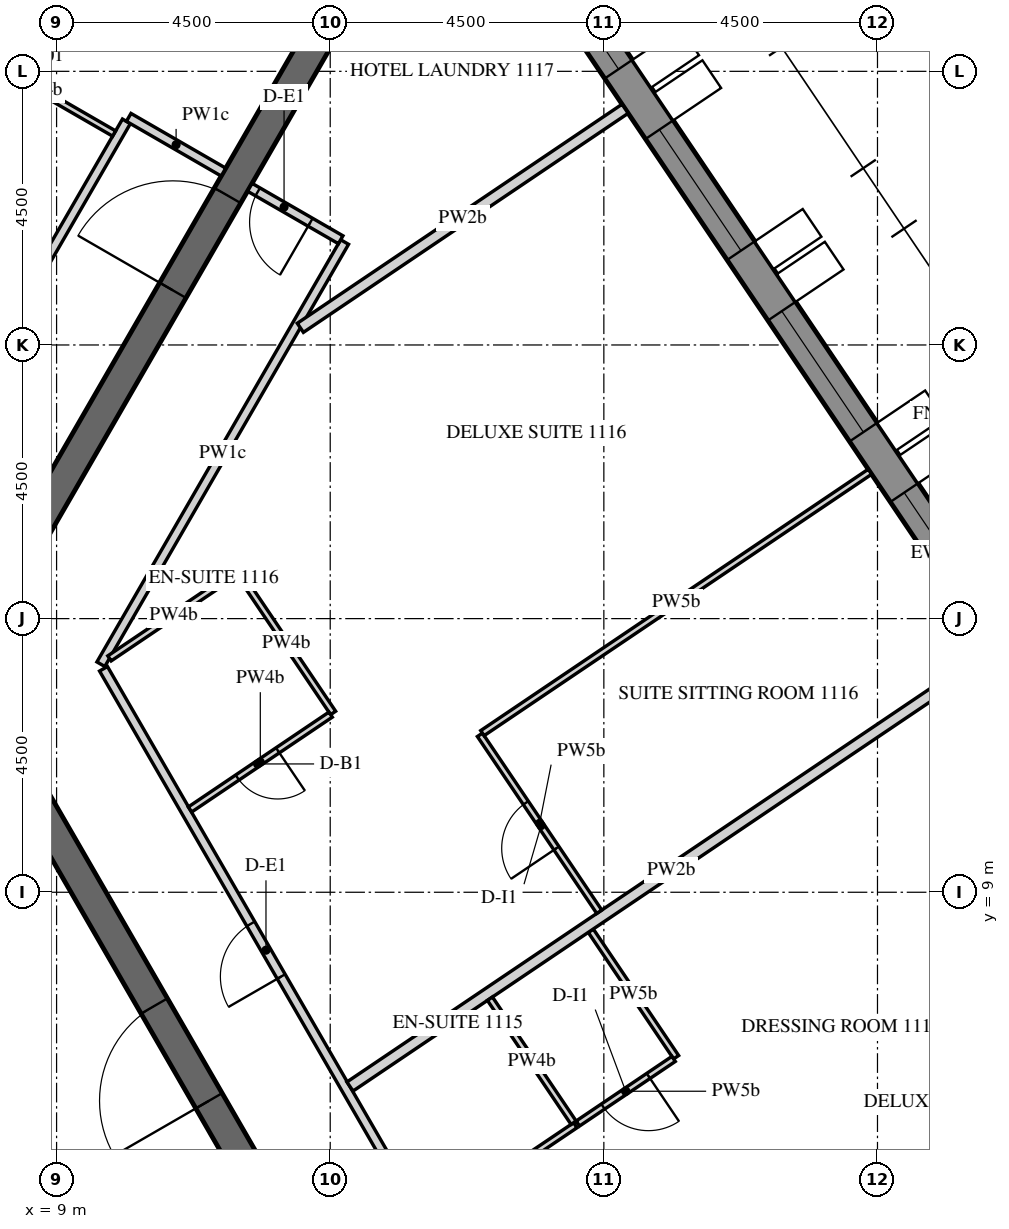
"""IFC4 building model, lengths in metres.
Left out: names, types, materials, properties, quantities, classifications, styles, units other than length and angle.
Written with IfcOpenShell. Run it as: python <this file> out.ifc"""

import sys

from ifc_helpers import new_model, si_unit, direction, frame, frame_2d, origin, place, context, subcontext, project, spatial, polyline, rectangle, outline, extrude, element, fill, save


model = new_model("IFC4")
c1 = context("Model", 3, precision=1e-05, world=origin(), true_north=direction((0.0, 1.0)))
c2 = subcontext(c1, "Body", "Model", "MODEL_VIEW")
j1 = project(units=[si_unit("LENGTHUNIT", "METRE"), si_unit("PLANEANGLEUNIT", "RADIAN")], contexts=[c1])
p1 = place(None, origin())
s1 = spatial("IfcSite", under=j1, at=p1, CompositionType="ELEMENT")
p2 = place(p1, origin())
s2 = spatial("IfcBuilding", under=s1, at=p2, CompositionType="ELEMENT")
p3 = place(p2, frame((0.0, 0.0, 152.7)))
s3 = spatial("IfcBuildingStorey", under=s2, at=p3, CompositionType="ELEMENT", Elevation=152.7)
p4 = place(p3, frame((31.371, 3.071, 0.0), z_axis=(0.0, 0.0, 1.0), x_axis=(-0.559189891278, 0.829039604297, 0.0)))
e1 = element("IfcWall", 1, at=p4, inside=s3, PredefinedType="SOLIDWALL", context=c2, shape_type="SweptSolid", body=[
    extrude(outline(polyline([(-0.026, -0.275), (27.781, -0.275), (27.736, 0.275), (0.026, 0.275), (-0.026, -0.275)])), origin(), (0.0, 0.0, 1.0), 3.75),
])
p5 = place(p4, frame((1.879, 0.0, 0.9)))
e2 = element("IfcOpeningElement", 2, at=p5, cuts=e1, PredefinedType="OPENING", context=c2, shape_type="SweptSolid", body=[
    extrude(rectangle(XDim=2.4, YDim=2.4, at=frame_2d((1.2, 1.2))), frame((0.0, 0.285, 0.0), z_axis=(0.0, -1.0, 0.0), x_axis=(1.0, 0.0, 0.0)), (0.0, 0.0, 1.0), 0.57),
])
p6 = place(p4, frame((5.479, 0.0, 0.9)))
e3 = element("IfcOpeningElement", 3, at=p6, cuts=e1, PredefinedType="OPENING", context=c2, shape_type="SweptSolid", body=[
    extrude(rectangle(XDim=2.4, YDim=2.4, at=frame_2d((1.2, 1.2))), frame((0.0, 0.285, 0.0), z_axis=(0.0, -1.0, 0.0), x_axis=(1.0, 0.0, 0.0)), (0.0, 0.0, 1.0), 0.57),
])
p7 = place(p4, frame((9.079, 0.0, 0.9)))
e4 = element("IfcOpeningElement", 4, at=p7, cuts=e1, PredefinedType="OPENING", context=c2, shape_type="SweptSolid", body=[
    extrude(rectangle(XDim=2.4, YDim=2.4, at=frame_2d((1.2, 1.2))), frame((0.0, 0.285, 0.0), z_axis=(0.0, -1.0, 0.0), x_axis=(1.0, 0.0, 0.0)), (0.0, 0.0, 1.0), 0.57),
])
p8 = place(p4, frame((12.679, 0.0, 0.9)))
e5 = element("IfcOpeningElement", 5, at=p8, cuts=e1, PredefinedType="OPENING", context=c2, shape_type="SweptSolid", body=[
    extrude(rectangle(XDim=2.4, YDim=2.4, at=frame_2d((1.2, 1.2))), frame((0.0, 0.285, 0.0), z_axis=(0.0, -1.0, 0.0), x_axis=(1.0, 0.0, 0.0)), (0.0, 0.0, 1.0), 0.57),
])
p9 = place(p4, frame((16.279, 0.0, 0.9)))
e6 = element("IfcOpeningElement", 6, at=p9, cuts=e1, PredefinedType="OPENING", context=c2, shape_type="SweptSolid", body=[
    extrude(rectangle(XDim=2.4, YDim=2.4, at=frame_2d((1.2, 1.2))), frame((0.0, 0.285, 0.0), z_axis=(0.0, -1.0, 0.0), x_axis=(1.0, 0.0, 0.0)), (0.0, 0.0, 1.0), 0.57),
])
p10 = place(p4, frame((19.879, 0.0, 0.9)))
e7 = element("IfcOpeningElement", 7, at=p10, cuts=e1, PredefinedType="OPENING", context=c2, shape_type="SweptSolid", body=[
    extrude(rectangle(XDim=2.4, YDim=2.4, at=frame_2d((1.2, 1.2))), frame((0.0, 0.285, 0.0), z_axis=(0.0, -1.0, 0.0), x_axis=(1.0, 0.0, 0.0)), (0.0, 0.0, 1.0), 0.57),
])
p11 = place(p4, frame((23.479, 0.0, 0.9)))
e8 = element("IfcOpeningElement", 8, at=p11, cuts=e1, PredefinedType="OPENING", context=c2, shape_type="SweptSolid", body=[
    extrude(rectangle(XDim=2.4, YDim=2.4, at=frame_2d((1.2, 1.2))), frame((0.0, 0.285, 0.0), z_axis=(0.0, -1.0, 0.0), x_axis=(1.0, 0.0, 0.0)), (0.0, 0.0, 1.0), 0.57),
])
p12 = place(p3, frame((14.722, 0.0, 0.0), z_axis=(0.0, 0.0, 1.0), x_axis=(-0.50000571537, 0.866022103989, 0.0)))
e9 = element("IfcWall", 9, at=p12, inside=s3, PredefinedType="SHEAR", context=c2, shape_type="SweptSolid", body=[
    extrude(outline(polyline([(-0.144, -0.25), (14.867, -0.25), (14.578, 0.25), (0.144, 0.25), (-0.144, -0.25)])), origin(), (0.0, 0.0, 1.0), 3.75),
])
p13 = place(p12, frame((6.432, 0.0, 0.0)))
e10 = element("IfcOpeningElement", 10, at=p13, cuts=e9, PredefinedType="OPENING", context=c2, shape_type="SweptSolid", body=[
    extrude(rectangle(XDim=1.8, YDim=2.4, at=frame_2d((0.9, 1.2))), frame((0.0, 0.26, 0.0), z_axis=(0.0, -1.0, 0.0), x_axis=(1.0, 0.0, 0.0)), (0.0, 0.0, 1.0), 0.52),
])
p14 = place(p3, frame((7.506, 13.0, 0.0), z_axis=(0.0, 0.0, 1.0), x_axis=(0.499988271576, 0.866032175087, 0.0)))
e11 = element("IfcWall", 11, at=p14, inside=s3, PredefinedType="SHEAR", context=c2, shape_type="SweptSolid", body=[
    extrude(rectangle(XDim=15.424, YDim=0.5, at=frame_2d((7.712, 0.0))), origin(), (0.0, 0.0, 1.0), 3.75),
])
p15 = place(p14, frame((6.812, 0.0, 0.0)))
e12 = element("IfcOpeningElement", 12, at=p15, cuts=e11, PredefinedType="OPENING", context=c2, shape_type="SweptSolid", body=[
    extrude(rectangle(XDim=1.8, YDim=2.4, at=frame_2d((0.9, 1.2))), frame((0.0, 0.26, 0.0), z_axis=(0.0, -1.0, 0.0), x_axis=(1.0, 0.0, 0.0)), (0.0, 0.0, 1.0), 0.52),
])
p16 = place(p3, frame((11.345, 0.0, 0.0), z_axis=(0.0, 0.0, 1.0), x_axis=(-0.499995046907, 0.866028263435, 0.0)))
e13 = element("IfcWall", 13, at=p16, inside=s3, PredefinedType="SHEAR", context=c2, shape_type="SweptSolid", body=[
    extrude(outline(polyline([(-0.101, -0.175), (11.446, -0.175), (11.244, 0.175), (0.101, 0.175), (-0.101, -0.175)])), origin(), (0.0, 0.0, 1.0), 3.75),
])
p17 = place(p16, frame((4.744, 0.0, 0.0)))
e14 = element("IfcOpeningElement", 14, at=p17, cuts=e13, PredefinedType="OPENING", context=c2, shape_type="SweptSolid", body=[
    extrude(rectangle(XDim=1.8, YDim=2.4, at=frame_2d((0.9, 1.2))), frame((0.0, 0.185, 0.0), z_axis=(0.0, -1.0, 0.0), x_axis=(1.0, 0.0, 0.0)), (0.0, 0.0, 1.0), 0.37),
])
p18 = place(p3, frame((10.149, 21.678, 0.0), z_axis=(0.0, 0.0, 1.0), x_axis=(-0.499997422768, -0.866026891745, 0.0)))
e15 = element("IfcWall", 15, at=p18, inside=s3, PredefinedType="PARTITIONING", context=c2, shape_type="SweptSolid", body=[
    extrude(rectangle(XDim=7.942, YDim=0.15, at=frame_2d((3.971, 0.0))), origin(), (0.0, 0.0, 1.0), 2.823),
])
p19 = place(p18, frame((4.833, 0.0, 0.0)))
e16 = element("IfcOpeningElement", 16, at=p19, cuts=e15, PredefinedType="OPENING", context=c2, shape_type="SweptSolid", body=[
    extrude(rectangle(XDim=1.0, YDim=2.1, at=frame_2d((0.5, 1.05))), frame((0.0, 0.085, 0.0), z_axis=(0.0, -1.0, 0.0), x_axis=(1.0, 0.0, 0.0)), (0.0, 0.0, 1.0), 0.17),
])
p20 = place(p3, frame((11.745, 20.843, 0.0), z_axis=(0.0, 0.0, 1.0), x_axis=(-0.865989075817, 0.500062916607, 0.0)))
e17 = element("IfcWall", 17, at=p20, inside=s3, PredefinedType="PARTITIONING", context=c2, shape_type="SweptSolid", body=[
    extrude(rectangle(XDim=1.8, YDim=0.15, at=frame_2d((0.9, 0.0))), origin(), (0.0, 0.0, 1.0), 2.823),
])
p21 = place(p3, frame((17.046, 0.075, 0.0), z_axis=(0.0, 0.0, 1.0), x_axis=(-0.499999403554, 0.866025748143, 0.0)))
e18 = element("IfcWall", 18, at=p21, inside=s3, PredefinedType="PARTITIONING", context=c2, shape_type="SweptSolid", body=[
    extrude(rectangle(XDim=14.549, YDim=0.15, at=frame_2d((7.275, 0.0))), origin(), (0.0, 0.0, 1.0), 2.823),
])
p22 = place(p21, frame((1.781, 0.0, 0.0)))
e19 = element("IfcOpeningElement", 19, at=p22, cuts=e18, PredefinedType="OPENING", context=c2, shape_type="SweptSolid", body=[
    extrude(rectangle(XDim=1.0, YDim=2.1, at=frame_2d((0.5, 1.05))), frame((0.0, 0.085, 0.0), z_axis=(0.0, -1.0, 0.0), x_axis=(1.0, 0.0, 0.0)), (0.0, 0.0, 1.0), 0.17),
])
p23 = place(p21, frame((8.705, 0.0, 0.0)))
e20 = element("IfcOpeningElement", 20, at=p23, cuts=e18, PredefinedType="OPENING", context=c2, shape_type="SweptSolid", body=[
    extrude(rectangle(XDim=1.0, YDim=2.1, at=frame_2d((0.5, 1.05))), frame((0.0, 0.085, 0.0), z_axis=(0.0, -1.0, 0.0), x_axis=(1.0, 0.0, 0.0)), (0.0, 0.0, 1.0), 0.17),
])
p24 = place(p3, frame((9.728, 12.75, 0.0), z_axis=(0.0, 0.0, 1.0), x_axis=(0.500007149838, 0.866021275784, 0.0)))
e21 = element("IfcWall", 21, at=p24, inside=s3, PredefinedType="PARTITIONING", context=c2, shape_type="SweptSolid", body=[
    extrude(rectangle(XDim=8.017, YDim=0.15, at=frame_2d((4.009, 0.0))), origin(), (0.0, 0.0, 1.0), 2.823),
])
p25 = place(p3, frame((13.672, 19.73, 0.0), z_axis=(0.0, 0.0, 1.0), x_axis=(-0.866074815912, 0.499914405916, 0.0)))
e22 = element("IfcWall", 22, at=p25, inside=s3, PredefinedType="PARTITIONING", context=c2, shape_type="SweptSolid", body=[
    extrude(rectangle(XDim=1.725, YDim=0.15, at=frame_2d((0.862, 0.0))), origin(), (0.0, 0.0, 1.0), 2.823),
])
p26 = place(p25, frame((0.575, 0.0, 0.0)))
e23 = element("IfcOpeningElement", 23, at=p26, cuts=e22, PredefinedType="OPENING", context=c2, shape_type="SweptSolid", body=[
    extrude(rectangle(XDim=1.0, YDim=2.1, at=frame_2d((0.5, 1.05))), frame((0.0, 0.085, 0.0), z_axis=(0.0, -1.0, 0.0), x_axis=(1.0, 0.0, 0.0)), (0.0, 0.0, 1.0), 0.17),
])
p27 = place(p3, frame((7.456, 22.915, 0.0), z_axis=(0.0, 0.0, 1.0), x_axis=(0.866018712932, -0.500011588718, 0.0)))
e24 = element("IfcWall", 24, at=p27, inside=s3, PredefinedType="PARTITIONING", context=c2, shape_type="SweptSolid", body=[
    extrude(rectangle(XDim=2.875, YDim=0.1, at=frame_2d((1.438, 0.0))), origin(), (0.0, 0.0, 1.0), 2.823),
])
p28 = place(p3, frame((17.53, 5.168, 0.0), z_axis=(0.0, 0.0, 1.0), x_axis=(-0.829031257997, -0.559202265073, 0.0)))
e25 = element("IfcWall", 25, at=p28, inside=s3, PredefinedType="PARTITIONING", context=c2, shape_type="SweptSolid", body=[
    extrude(rectangle(XDim=2.898, YDim=0.1, at=frame_2d((1.449, 0.0))), origin(), (0.0, 0.0, 1.0), 2.823),
])
p29 = place(p28, frame((1.1, 0.0, 0.0)))
e26 = element("IfcOpeningElement", 26, at=p29, cuts=e25, PredefinedType="OPENING", context=c2, shape_type="SweptSolid", body=[
    extrude(rectangle(XDim=0.8, YDim=2.1, at=frame_2d((0.4, 1.05))), frame((0.0, 0.06, 0.0), z_axis=(0.0, -1.0, 0.0), x_axis=(1.0, 0.0, 0.0)), (0.0, 0.0, 1.0), 0.12),
])
p30 = place(p3, frame((17.785, 8.368, 0.0), z_axis=(0.0, 0.0, 1.0), x_axis=(0.559203861497, -0.829030181168, 0.0)))
e27 = element("IfcWall", 27, at=p30, inside=s3, PredefinedType="PARTITIONING", context=c2, shape_type="SweptSolid", body=[
    extrude(rectangle(XDim=2.51, YDim=0.1, at=frame_2d((1.255, 0.0))), origin(), (0.0, 0.0, 1.0), 2.823),
])
p31 = place(p3, frame((19.147, 6.259, 0.0), z_axis=(0.0, 0.0, 1.0), x_axis=(-0.82903334026, -0.559199178055, 0.0)))
e28 = element("IfcWall", 28, at=p31, inside=s3, PredefinedType="PARTITIONING", context=c2, shape_type="SweptSolid", body=[
    extrude(rectangle(XDim=1.9, YDim=0.1, at=frame_2d((0.95, 0.0))), origin(), (0.0, 0.0, 1.0), 2.823),
])
p32 = place(p31, frame((0.5, 0.0, 0.0)))
e29 = element("IfcOpeningElement", 29, at=p32, cuts=e28, PredefinedType="OPENING", context=c2, shape_type="SweptSolid", body=[
    extrude(rectangle(XDim=0.9, YDim=2.1, at=frame_2d((0.45, 1.05))), frame((0.0, 0.06, 0.0), z_axis=(0.0, -1.0, 0.0), x_axis=(1.0, 0.0, 0.0)), (0.0, 0.0, 1.0), 0.12),
])
p33 = place(p3, frame((24.389, 12.931, 0.0), z_axis=(0.0, 0.0, 1.0), x_axis=(-0.829049407957, -0.559175356365, 0.0)))
e30 = element("IfcWall", 30, at=p33, inside=s3, PredefinedType="PARTITIONING", context=c2, shape_type="SweptSolid", body=[
    extrude(rectangle(XDim=12.743, YDim=0.18, at=frame_2d((6.372, 0.0))), origin(), (0.0, 0.0, 1.0), 2.823),
])
p34 = place(p3, frame((17.502, 5.21, 0.0), z_axis=(0.0, 0.0, 1.0), x_axis=(-0.559203533395, 0.829030402481, 0.0)))
e31 = element("IfcWall", 31, at=p34, inside=s3, PredefinedType="PARTITIONING", context=c2, shape_type="SweptSolid", body=[
    extrude(rectangle(XDim=2.46, YDim=0.1, at=frame_2d((1.23, 0.0))), origin(), (0.0, 0.0, 1.0), 2.823),
])
p35 = place(p3, frame((9.87, 12.846, 0.0), z_axis=(0.0, 0.0, 1.0), x_axis=(0.829045266323, 0.559181496821, 0.0)))
e32 = element("IfcWall", 32, at=p35, inside=s3, PredefinedType="PARTITIONING", context=c2, shape_type="SweptSolid", body=[
    extrude(rectangle(XDim=2.548, YDim=0.1, at=frame_2d((1.274, 0.0))), origin(), (0.0, 0.0, 1.0), 2.823),
])
p36 = place(p3, frame((12.01, 14.229, 0.0), z_axis=(0.0, 0.0, 1.0), x_axis=(0.559158698756, -0.8290606429, 0.0)))
e33 = element("IfcWall", 33, at=p36, inside=s3, PredefinedType="PARTITIONING", context=c2, shape_type="SweptSolid", body=[
    extrude(rectangle(XDim=2.75, YDim=0.1, at=frame_2d((1.375, 0.0))), origin(), (0.0, 0.0, 1.0), 2.823),
])
p37 = place(p3, frame((13.506, 11.921, 0.0), z_axis=(0.0, 0.0, 1.0), x_axis=(-0.829048535811, -0.559176649431, 0.0)))
e34 = element("IfcWall", 34, at=p37, inside=s3, PredefinedType="PARTITIONING", context=c2, shape_type="SweptSolid", body=[
    extrude(rectangle(XDim=2.789, YDim=0.1, at=frame_2d((1.395, 0.0))), origin(), (0.0, 0.0, 1.0), 2.823),
])
p38 = place(p37, frame((1.05, 0.0, 0.0)))
e35 = element("IfcOpeningElement", 35, at=p38, cuts=e34, PredefinedType="OPENING", context=c2, shape_type="SweptSolid", body=[
    extrude(rectangle(XDim=0.8, YDim=2.1, at=frame_2d((0.4, 1.05))), frame((0.0, 0.06, 0.0), z_axis=(0.0, -1.0, 0.0), x_axis=(1.0, 0.0, 0.0)), (0.0, 0.0, 1.0), 0.12),
])
p39 = place(p3, frame((17.925, 8.679, 0.0), z_axis=(0.0, 0.0, 1.0), x_axis=(-0.559170576854, 0.829052631611, 0.0)))
e36 = element("IfcWall", 36, at=p39, inside=s3, PredefinedType="PARTITIONING", context=c2, shape_type="SweptSolid", body=[
    extrude(rectangle(XDim=3.51, YDim=0.1, at=frame_2d((1.755, 0.0))), origin(), (0.0, 0.0, 1.0), 2.823),
])
p40 = place(p39, frame((1.26, 0.0, 0.0)))
e37 = element("IfcOpeningElement", 37, at=p40, cuts=e36, PredefinedType="OPENING", context=c2, shape_type="SweptSolid", body=[
    extrude(rectangle(XDim=0.9, YDim=2.1, at=frame_2d((0.45, 1.05))), frame((0.0, 0.06, 0.0), z_axis=(0.0, -1.0, 0.0), x_axis=(1.0, 0.0, 0.0)), (0.0, 0.0, 1.0), 0.12),
])
p41 = place(p3, frame((16.003, 11.617, 0.0), z_axis=(0.0, 0.0, 1.0), x_axis=(0.829037886281, 0.559192438352, 0.0)))
e38 = element("IfcWall", 38, at=p41, inside=s3, PredefinedType="PARTITIONING", context=c2, shape_type="SweptSolid", body=[
    extrude(rectangle(XDim=7.687, YDim=0.1, at=frame_2d((3.843, 0.0))), origin(), (0.0, 0.0, 1.0), 2.823),
])
p42 = place(p3, frame((18.35, 21.884, 0.0), z_axis=(0.0, 0.0, 1.0), x_axis=(-0.829047205772, -0.559178621374, 0.0)))
e39 = element("IfcWall", 39, at=p42, inside=s3, PredefinedType="PARTITIONING", context=c2, shape_type="SweptSolid", body=[
    extrude(rectangle(XDim=6.442, YDim=0.18, at=frame_2d((3.221, 0.0))), origin(), (0.0, 0.0, 1.0), 2.823),
])
p43 = place(p8, frame((0.0, 0.205, 0.0)))
e40 = element("IfcWindow", 40, at=p43, inside=s3, PartitioningType="DOUBLE_PANEL_VERTICAL", PredefinedType="WINDOW", context=c2, shape_type="SweptSolid", body=[
    extrude(rectangle(XDim=2.4, YDim=2.4, at=frame_2d((1.2, 1.2))), frame((0.0, 0.03, 0.0), z_axis=(0.0, -1.0, 0.0), x_axis=(1.0, 0.0, 0.0)), (0.0, 0.0, 1.0), 0.06),
])
fill(e5, e40)
p44 = place(p9, frame((0.0, 0.205, 0.0)))
e41 = element("IfcWindow", 41, at=p44, inside=s3, PartitioningType="DOUBLE_PANEL_VERTICAL", PredefinedType="WINDOW", context=c2, shape_type="SweptSolid", body=[
    extrude(rectangle(XDim=2.4, YDim=2.4, at=frame_2d((1.2, 1.2))), frame((0.0, 0.03, 0.0), z_axis=(0.0, -1.0, 0.0), x_axis=(1.0, 0.0, 0.0)), (0.0, 0.0, 1.0), 0.06),
])
fill(e6, e41)
p45 = place(p10, frame((0.0, 0.205, 0.0)))
e42 = element("IfcWindow", 42, at=p45, inside=s3, PartitioningType="DOUBLE_PANEL_VERTICAL", PredefinedType="WINDOW", context=c2, shape_type="SweptSolid", body=[
    extrude(rectangle(XDim=2.4, YDim=2.4, at=frame_2d((1.2, 1.2))), frame((0.0, 0.03, 0.0), z_axis=(0.0, -1.0, 0.0), x_axis=(1.0, 0.0, 0.0)), (0.0, 0.0, 1.0), 0.06),
])
fill(e7, e42)
p46 = place(p11, frame((0.0, 0.205, 0.0)))
e43 = element("IfcWindow", 43, at=p46, inside=s3, PartitioningType="DOUBLE_PANEL_VERTICAL", PredefinedType="WINDOW", context=c2, shape_type="SweptSolid", body=[
    extrude(rectangle(XDim=2.4, YDim=2.4, at=frame_2d((1.2, 1.2))), frame((0.0, 0.03, 0.0), z_axis=(0.0, -1.0, 0.0), x_axis=(1.0, 0.0, 0.0)), (0.0, 0.0, 1.0), 0.06),
])
fill(e8, e43)
p47 = place(p13, origin())
e44 = element("IfcDoor", 44, at=p47, inside=s3, OperationType="DOUBLE_DOOR_SINGLE_SWING", PredefinedType="DOOR", context=c2, shape_type="SweptSolid", body=[
    extrude(rectangle(XDim=1.8, YDim=2.4, at=frame_2d((0.9, 1.2))), frame((0.0, 0.025, 0.0), z_axis=(0.0, -1.0, 0.0), x_axis=(1.0, 0.0, 0.0)), (0.0, 0.0, 1.0), 0.05),
])
fill(e10, e44)
p48 = place(p15, origin())
e45 = element("IfcDoor", 45, at=p48, inside=s3, OperationType="DOUBLE_DOOR_SINGLE_SWING", PredefinedType="DOOR", context=c2, shape_type="SweptSolid", body=[
    extrude(rectangle(XDim=1.8, YDim=2.4, at=frame_2d((0.9, 1.2))), frame((0.0, 0.025, 0.0), z_axis=(0.0, -1.0, 0.0), x_axis=(1.0, 0.0, 0.0)), (0.0, 0.0, 1.0), 0.05),
])
fill(e12, e45)
p49 = place(p17, origin())
e46 = element("IfcDoor", 46, at=p49, inside=s3, OperationType="DOUBLE_DOOR_SINGLE_SWING", PredefinedType="DOOR", context=c2, shape_type="SweptSolid", body=[
    extrude(rectangle(XDim=1.8, YDim=2.4, at=frame_2d((0.9, 1.2))), frame((0.0, 0.025, 0.0), z_axis=(0.0, -1.0, 0.0), x_axis=(1.0, 0.0, 0.0)), (0.0, 0.0, 1.0), 0.05),
])
fill(e14, e46)
p50 = place(p32, origin())
e47 = element("IfcDoor", 47, at=p50, inside=s3, OperationType="SINGLE_SWING_RIGHT", PredefinedType="DOOR", context=c2, shape_type="SweptSolid", body=[
    extrude(rectangle(XDim=0.9, YDim=2.1, at=frame_2d((0.45, 1.05))), frame((0.0, 0.025, 0.0), z_axis=(0.0, -1.0, 0.0), x_axis=(1.0, 0.0, 0.0)), (0.0, 0.0, 1.0), 0.05),
])
fill(e29, e47)
p51 = place(p23, origin())
e48 = element("IfcDoor", 48, at=p51, inside=s3, OperationType="SINGLE_SWING_RIGHT", PredefinedType="DOOR", context=c2, shape_type="SweptSolid", body=[
    extrude(rectangle(XDim=1.0, YDim=2.1, at=frame_2d((0.5, 1.05))), frame((0.0, 0.025, 0.0), z_axis=(0.0, -1.0, 0.0), x_axis=(1.0, 0.0, 0.0)), (0.0, 0.0, 1.0), 0.05),
])
fill(e20, e48)
p52 = place(p38, origin())
e49 = element("IfcDoor", 49, at=p52, inside=s3, OperationType="SINGLE_SWING_LEFT", PredefinedType="DOOR", context=c2, shape_type="SweptSolid", body=[
    extrude(rectangle(XDim=0.8, YDim=2.1, at=frame_2d((0.4, 1.05))), frame((0.0, 0.025, 0.0), z_axis=(0.0, -1.0, 0.0), x_axis=(1.0, 0.0, 0.0)), (0.0, 0.0, 1.0), 0.05),
])
fill(e35, e49)
p53 = place(p40, origin())
e50 = element("IfcDoor", 50, at=p53, inside=s3, OperationType="SINGLE_SWING_RIGHT", PredefinedType="DOOR", context=c2, shape_type="SweptSolid", body=[
    extrude(rectangle(XDim=0.9, YDim=2.1, at=frame_2d((0.45, 1.05))), frame((0.0, 0.025, 0.0), z_axis=(0.0, -1.0, 0.0), x_axis=(1.0, 0.0, 0.0)), (0.0, 0.0, 1.0), 0.05),
])
fill(e37, e50)
p54 = place(p26, origin())
e51 = element("IfcDoor", 51, at=p54, inside=s3, OperationType="SINGLE_SWING_LEFT", PredefinedType="DOOR", context=c2, shape_type="SweptSolid", body=[
    extrude(rectangle(XDim=1.0, YDim=2.1, at=frame_2d((0.5, 1.05))), frame((0.0, 0.025, 0.0), z_axis=(0.0, -1.0, 0.0), x_axis=(1.0, 0.0, 0.0)), (0.0, 0.0, 1.0), 0.05),
])
fill(e23, e51)
save(model, sys.argv[1])
